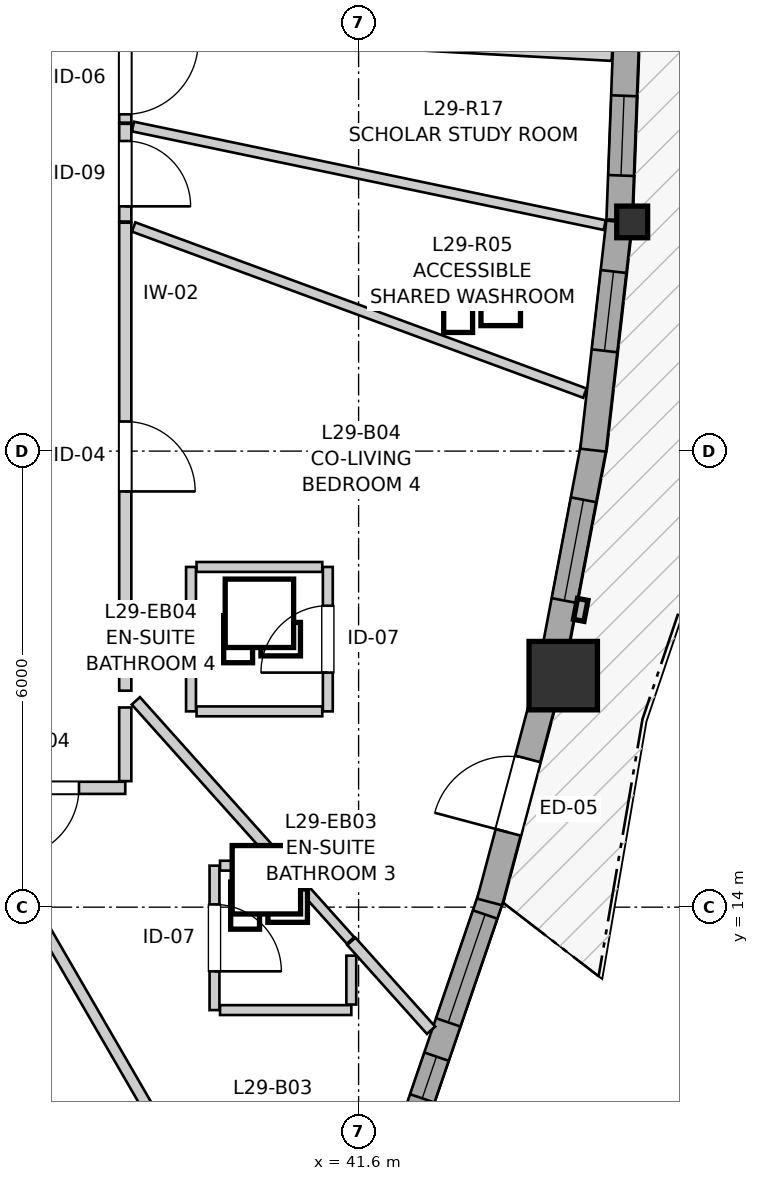
"""IFC4 building model, lengths in metres.
Left out: names, types, materials, properties, quantities, classifications, styles, units other than length and angle.
Written with IfcOpenShell. Run it as: python <this file> out.ifc"""

import sys

from ifc_helpers import new_model, si_unit, direction, frame, frame_2d, origin, origin_2d, place, context, subcontext, project, spatial, rectangle, i_section, extrude, source, transform, mapped, element, fill, save


model = new_model("IFC4")
c1 = context("Model", 3, precision=1e-05, world=origin(), true_north=direction((0.0, 1.0)))
c2 = subcontext(c1, "Body", "Model", "MODEL_VIEW")
j1 = project(units=[si_unit("LENGTHUNIT", "METRE"), si_unit("PLANEANGLEUNIT", "RADIAN")], contexts=[c1])
p1 = place(None, origin())
s1 = spatial("IfcSite", under=j1, at=p1, CompositionType="ELEMENT")
p2 = place(p1, origin())
s2 = spatial("IfcBuilding", under=s1, at=p2, CompositionType="ELEMENT")
p3 = place(p2, frame((0.0, 0.0, 99.2)))
s3 = spatial("IfcBuildingStorey", under=s2, at=p3, CompositionType="ELEMENT", Elevation=99.2)
m1 = source(origin(), c2, "Body", "SweptSolid", [
    extrude(rectangle(XDim=0.9, YDim=0.9, at=origin_2d()), origin(), (0.0, 0.0, 1.0), 2.95),
])
p4 = place(p3, frame((44.292, 17.046, 0.0), z_axis=(0.0, 0.0, 1.0), x_axis=(1.0, 0.0, 0.0)))
e1 = element("IfcColumn", 1, at=p4, inside=s3, PredefinedType="COLUMN", context=c2, shape_type="MappedRepresentation", body=[
    mapped(m1, transform((0.0, 0.0, 0.0), x_axis=(1.0, 0.0, 0.0), y_axis=(0.0, 1.0, 0.0), z_axis=(0.0, 0.0, 1.0), scale=1.0)),
])
m2 = source(origin(), c2, "Body", "SweptSolid", [
    extrude(i_section(OverallWidth=0.406, OverallDepth=0.416, WebThickness=0.027, FlangeThickness=0.044, FilletRadius=0.015, at=origin_2d()), origin(), (0.0, 0.0, 1.0), 2.95),
])
p5 = place(p3, frame((45.199, 23.015, 0.0), z_axis=(0.0, 0.0, 1.0), x_axis=(1.0, 0.0, 0.0)))
e2 = element("IfcColumn", 2, at=p5, inside=s3, PredefinedType="PILASTER", context=c2, shape_type="MappedRepresentation", body=[
    mapped(m2, transform((0.0, 0.0, 0.0), x_axis=(1.0, 0.0, 0.0), y_axis=(0.0, 1.0, 0.0), z_axis=(0.0, 0.0, 1.0), scale=1.0)),
])
p6 = place(p3, frame((42.323, 11.151, 0.0), z_axis=(0.0, 0.0, 1.0), x_axis=(0.323606092462, 0.94619189223, 0.0)))
e3 = element("IfcWall", 3, at=p6, inside=s3, PredefinedType="SOLIDWALL", context=c2, shape_type="SweptSolid", body=[
    extrude(rectangle(XDim=3.172, YDim=0.34, at=frame_2d((1.586, 0.0))), origin(), (0.0, 0.0, 1.0), 2.48),
])
p7 = place(p6, frame((0.353, 0.0, 0.82)))
e4 = element("IfcOpeningElement", 4, at=p7, cuts=e3, PredefinedType="OPENING", context=c2, shape_type="SweptSolid", body=[
    extrude(rectangle(XDim=0.58, YDim=1.35, at=frame_2d((0.29, 0.675))), frame((0.0, 0.18, 0.0), z_axis=(0.0, -1.0, 0.0), x_axis=(1.0, 0.0, 0.0)), (0.0, 0.0, 1.0), 0.36),
])
p8 = place(p6, frame((1.41, 0.0, 0.82)))
e5 = element("IfcOpeningElement", 5, at=p8, cuts=e3, PredefinedType="OPENING", context=c2, shape_type="SweptSolid", body=[
    extrude(rectangle(XDim=1.5, YDim=1.45, at=frame_2d((0.75, 0.725))), frame((0.0, 0.18, 0.0), z_axis=(0.0, -1.0, 0.0), x_axis=(1.0, 0.0, 0.0)), (0.0, 0.0, 1.0), 0.36),
])
p9 = place(p3, frame((43.324, 14.068, 0.0), z_axis=(0.0, 0.0, 1.0), x_axis=(0.257085513118, 0.966388658328, 0.0)))
e6 = element("IfcWall", 6, at=p9, inside=s3, PredefinedType="SOLIDWALL", context=c2, shape_type="SweptSolid", body=[
    extrude(rectangle(XDim=2.896, YDim=0.34, at=frame_2d((1.448, 0.0))), origin(), (0.0, 0.0, 1.0), 2.48),
])
p10 = place(p9, frame((0.948, 0.0, 0.0)))
e7 = element("IfcOpeningElement", 7, at=p10, cuts=e6, PredefinedType="OPENING", context=c2, shape_type="SweptSolid", body=[
    extrude(rectangle(XDim=1.0, YDim=2.1, at=frame_2d((0.5, 1.05))), frame((0.0, 0.18, 0.0), z_axis=(0.0, -1.0, 0.0), x_axis=(1.0, 0.0, 0.0)), (0.0, 0.0, 1.0), 0.36),
])
p11 = place(p3, frame((44.168, 17.304, 0.0), z_axis=(0.0, 0.0, 1.0), x_axis=(0.186654850509, 0.982425552793, 0.0)))
e8 = element("IfcWall", 8, at=p11, inside=s3, PredefinedType="SOLIDWALL", context=c2, shape_type="SweptSolid", body=[
    extrude(rectangle(XDim=2.846, YDim=0.34, at=frame_2d((1.423, 0.0))), origin(), (0.0, 0.0, 1.0), 2.48),
])
p12 = place(p11, frame((0.743, 0.0, 0.82)))
e9 = element("IfcOpeningElement", 9, at=p12, cuts=e8, PredefinedType="OPENING", context=c2, shape_type="SweptSolid", body=[
    extrude(rectangle(XDim=1.35, YDim=1.45, at=frame_2d((0.675, 0.725))), frame((0.0, 0.18, 0.0), z_axis=(0.0, -1.0, 0.0), x_axis=(1.0, 0.0, 0.0)), (0.0, 0.0, 1.0), 0.36),
])
p13 = place(p3, frame((44.686, 20.012, 0.0), z_axis=(0.0, 0.0, 1.0), x_axis=(0.113268604106, 0.993564403209, 0.0)))
e10 = element("IfcWall", 10, at=p13, inside=s3, PredefinedType="SOLIDWALL", context=c2, shape_type="SweptSolid", body=[
    extrude(rectangle(XDim=3.022, YDim=0.34, at=frame_2d((1.511, 0.0))), origin(), (0.0, 0.0, 1.0), 2.48),
])
p14 = place(p13, frame((1.316, 0.0, 0.82)))
e11 = element("IfcOpeningElement", 11, at=p14, cuts=e10, PredefinedType="OPENING", context=c2, shape_type="SweptSolid", body=[
    extrude(rectangle(XDim=1.05, YDim=1.45, at=frame_2d((0.525, 0.725))), frame((0.0, 0.18, 0.0), z_axis=(0.0, -1.0, 0.0), x_axis=(1.0, 0.0, 0.0)), (0.0, 0.0, 1.0), 0.36),
])
p15 = place(p3, frame((45.031, 23.042, 0.0), z_axis=(0.0, 0.0, 1.0), x_axis=(0.037943223979, 0.999279896603, 0.0)))
e12 = element("IfcWall", 12, at=p15, inside=s3, PredefinedType="SOLIDWALL", context=c2, shape_type="SweptSolid", body=[
    extrude(rectangle(XDim=3.005, YDim=0.34, at=frame_2d((1.502, 0.0))), origin(), (0.0, 0.0, 1.0), 2.48),
])
p16 = place(p15, frame((0.584, 0.0, 0.82)))
e13 = element("IfcOpeningElement", 13, at=p16, cuts=e12, PredefinedType="OPENING", context=c2, shape_type="SweptSolid", body=[
    extrude(rectangle(XDim=1.05, YDim=1.45, at=frame_2d((0.525, 0.725))), frame((0.0, 0.18, 0.0), z_axis=(0.0, -1.0, 0.0), x_axis=(1.0, 0.0, 0.0)), (0.0, 0.0, 1.0), 0.36),
])
p17 = place(p3, frame((38.53, 23.005, 0.0), z_axis=(0.0, 0.0, 1.0), x_axis=(0.0, -1.0, 0.0)))
e14 = element("IfcWall", 14, at=p17, inside=s3, PredefinedType="PARTITIONING", context=c2, shape_type="SweptSolid", body=[
    extrude(rectangle(XDim=6.157, YDim=0.16, at=frame_2d((3.079, 0.0))), origin(), (0.0, 0.0, 1.0), 2.95),
])
p18 = place(p17, frame((2.615, 0.0, 0.0)))
e15 = element("IfcOpeningElement", 15, at=p18, cuts=e14, PredefinedType="OPENING", context=c2, shape_type="SweptSolid", body=[
    extrude(rectangle(XDim=0.92, YDim=2.1, at=frame_2d((0.46, 1.05))), frame((0.0, 0.09, 0.0), z_axis=(0.0, -1.0, 0.0), x_axis=(1.0, 0.0, 0.0)), (0.0, 0.0, 1.0), 0.18),
])
p19 = place(p3, frame((38.53, 15.57, 0.0), z_axis=(0.0, 0.0, 1.0), x_axis=(-1.0, 0.0, 0.0)))
e16 = element("IfcWall", 16, at=p19, inside=s3, PredefinedType="PARTITIONING", context=c2, shape_type="SweptSolid", body=[
    extrude(rectangle(XDim=2.156, YDim=0.16, at=frame_2d((1.078, 0.0))), origin(), (0.0, 0.0, 1.0), 2.95),
])
p20 = place(p19, frame((0.609, 0.0, 0.0)))
e17 = element("IfcOpeningElement", 17, at=p20, cuts=e16, PredefinedType="OPENING", context=c2, shape_type="SweptSolid", body=[
    extrude(rectangle(XDim=0.92, YDim=2.1, at=frame_2d((0.46, 1.05))), frame((0.0, 0.09, 0.0), z_axis=(0.0, -1.0, 0.0), x_axis=(1.0, 0.0, 0.0)), (0.0, 0.0, 1.0), 0.18),
])
p21 = place(p3, frame((39.704, 14.546, 0.0), z_axis=(0.0, 0.0, 1.0), x_axis=(0.0, -1.0, 0.0)))
e18 = element("IfcWall", 18, at=p21, inside=s3, PredefinedType="PARTITIONING", context=c2, shape_type="SweptSolid", body=[
    extrude(rectangle(XDim=1.9, YDim=0.13, at=frame_2d((0.95, 0.0))), origin(), (0.0, 0.0, 1.0), 2.95),
])
p22 = place(p21, frame((0.51, 0.0, 0.0)))
e19 = element("IfcOpeningElement", 19, at=p22, cuts=e18, PredefinedType="OPENING", context=c2, shape_type="SweptSolid", body=[
    extrude(rectangle(XDim=0.88, YDim=2.05, at=frame_2d((0.44, 1.025))), frame((0.0, 0.075, 0.0), z_axis=(0.0, -1.0, 0.0), x_axis=(1.0, 0.0, 0.0)), (0.0, 0.0, 1.0), 0.15),
])
p23 = place(p3, frame((41.195, 16.576, 0.0), z_axis=(0.0, 0.0, 1.0), x_axis=(0.0, 1.0, 0.0)))
e20 = element("IfcWall", 20, at=p23, inside=s3, PredefinedType="PARTITIONING", context=c2, shape_type="SweptSolid", body=[
    extrude(rectangle(XDim=1.9, YDim=0.13, at=frame_2d((0.95, 0.0))), origin(), (0.0, 0.0, 1.0), 2.95),
])
p24 = place(p23, frame((0.51, 0.0, 0.0)))
e21 = element("IfcOpeningElement", 21, at=p24, cuts=e20, PredefinedType="OPENING", context=c2, shape_type="SweptSolid", body=[
    extrude(rectangle(XDim=0.88, YDim=2.05, at=frame_2d((0.44, 1.025))), frame((0.0, 0.075, 0.0), z_axis=(0.0, -1.0, 0.0), x_axis=(1.0, 0.0, 0.0)), (0.0, 0.0, 1.0), 0.15),
])
p25 = place(p3, frame((38.53, 24.306, 0.0), z_axis=(0.0, 0.0, 1.0), x_axis=(0.0, -1.0, 0.0)))
e22 = element("IfcWall", 22, at=p25, inside=s3, PredefinedType="PARTITIONING", context=c2, shape_type="SweptSolid", body=[
    extrude(rectangle(XDim=1.286, YDim=0.16, at=frame_2d((0.643, 0.0))), origin(), (0.0, 0.0, 1.0), 2.95),
])
p26 = place(p25, frame((0.226, 0.0, 0.0)))
e23 = element("IfcOpeningElement", 23, at=p26, cuts=e22, PredefinedType="OPENING", context=c2, shape_type="SweptSolid", body=[
    extrude(rectangle(XDim=0.86, YDim=2.05, at=frame_2d((0.43, 1.025))), frame((0.0, 0.09, 0.0), z_axis=(0.0, -1.0, 0.0), x_axis=(1.0, 0.0, 0.0)), (0.0, 0.0, 1.0), 0.18),
])
p27 = place(p3, frame((38.53, 25.525, 0.0), z_axis=(0.0, 0.0, 1.0), x_axis=(0.0, -1.0, 0.0)))
e24 = element("IfcWall", 24, at=p27, inside=s3, PredefinedType="PARTITIONING", context=c2, shape_type="SweptSolid", body=[
    extrude(rectangle(XDim=1.204, YDim=0.16, at=frame_2d((0.602, 0.0))), origin(), (0.0, 0.0, 1.0), 2.95),
])
p28 = place(p27, frame((0.134, 0.0, 0.0)))
e25 = element("IfcOpeningElement", 25, at=p28, cuts=e24, PredefinedType="OPENING", context=c2, shape_type="SweptSolid", body=[
    extrude(rectangle(XDim=0.96, YDim=2.1, at=frame_2d((0.48, 1.05))), frame((0.0, 0.09, 0.0), z_axis=(0.0, -1.0, 0.0), x_axis=(1.0, 0.0, 0.0)), (0.0, 0.0, 1.0), 0.18),
])
p29 = place(p3, frame((34.4, 15.457, 0.0), z_axis=(0.0, 0.0, 1.0), x_axis=(0.358586620169, -0.933496457324, 0.0)))
e26 = element("IfcWall", 26, at=p29, inside=s3, PredefinedType="PARTITIONING", context=c2, shape_type="SweptSolid", body=[
    extrude(rectangle(XDim=10.256, YDim=0.145, at=frame_2d((5.128, 0.0))), origin(), (0.0, 0.0, 1.0), 2.95),
])
p30 = place(p3, frame((36.463, 15.447, 0.0), z_axis=(0.0, 0.0, 1.0), x_axis=(0.501201369888, -0.86533068062, 0.0)))
e27 = element("IfcWall", 27, at=p30, inside=s3, PredefinedType="PARTITIONING", context=c2, shape_type="SweptSolid", body=[
    extrude(rectangle(XDim=8.918, YDim=0.145, at=frame_2d((4.459, 0.0))), origin(), (0.0, 0.0, 1.0), 2.95),
])
p31 = place(p3, frame((38.64, 22.948, 0.0), z_axis=(0.0, 0.0, 1.0), x_axis=(0.938426101424, -0.3454800315, 0.0)))
e28 = element("IfcWall", 28, at=p31, inside=s3, PredefinedType="PARTITIONING", context=c2, shape_type="SweptSolid", body=[
    extrude(rectangle(XDim=6.327, YDim=0.13, at=frame_2d((3.164, 0.0))), origin(), (0.0, 0.0, 1.0), 2.95),
])
p32 = place(p3, frame((38.631, 24.27, 0.0), z_axis=(0.0, 0.0, 1.0), x_axis=(0.978856283814, -0.204549201019, 0.0)))
e29 = element("IfcWall", 29, at=p32, inside=s3, PredefinedType="PARTITIONING", context=c2, shape_type="SweptSolid", body=[
    extrude(rectangle(XDim=6.341, YDim=0.13, at=frame_2d((3.171, 0.0))), origin(), (0.0, 0.0, 1.0), 2.95),
])
p33 = place(p3, frame((38.622, 25.55, 0.0), z_axis=(0.0, 0.0, 1.0), x_axis=(0.998518036703, -0.054421782211, 0.0)))
e30 = element("IfcWall", 30, at=p33, inside=s3, PredefinedType="PARTITIONING", context=c2, shape_type="SweptSolid", body=[
    extrude(rectangle(XDim=6.321, YDim=0.145, at=frame_2d((3.16, 0.0))), origin(), (0.0, 0.0, 1.0), 2.95),
])
p34 = place(p3, frame((38.669, 16.715, 0.0), z_axis=(0.0, 0.0, 1.0), x_axis=(0.667262858083, -0.744822313188, 0.0)))
e31 = element("IfcWall", 31, at=p34, inside=s3, PredefinedType="PARTITIONING", context=c2, shape_type="SweptSolid", body=[
    extrude(rectangle(XDim=2.912, YDim=0.145, at=frame_2d((1.456, 0.0))), origin(), (0.0, 0.0, 1.0), 2.95),
])
p35 = place(p3, frame((39.395, 16.576, 0.0), z_axis=(0.0, 0.0, 1.0), x_axis=(0.0, 1.0, 0.0)))
e32 = element("IfcWall", 32, at=p35, inside=s3, PredefinedType="PARTITIONING", context=c2, shape_type="SweptSolid", body=[
    extrude(rectangle(XDim=1.9, YDim=0.13, at=frame_2d((0.95, 0.0))), origin(), (0.0, 0.0, 1.0), 2.95),
])
p36 = place(p3, frame((39.777, 12.646, 0.0), z_axis=(0.0, 0.0, 1.0), x_axis=(1.0, 0.0, 0.0)))
e33 = element("IfcWall", 33, at=p36, inside=s3, PredefinedType="PARTITIONING", context=c2, shape_type="SweptSolid", body=[
    extrude(rectangle(XDim=1.727, YDim=0.13, at=frame_2d((0.863, 0.0))), origin(), (0.0, 0.0, 1.0), 2.95),
])
for number, where, z_axis, x_axis in (
    (34, (39.468, 18.476, 0.0), (0.0, 0.0, 1.0), (1.0, 0.0, 0.0)),
    (35, (39.468, 16.576, 0.0), (0.0, 0.0, 1.0), (1.0, 0.0, 0.0)),
):
    element("IfcWall", number, at=place(p3, frame(where, z_axis=z_axis, x_axis=x_axis)), inside=s3, PredefinedType="PARTITIONING", context=c2, shape_type="SweptSolid", body=[
        extrude(rectangle(XDim=1.654, YDim=0.13, at=frame_2d((0.827, 0.0))), origin(), (0.0, 0.0, 1.0), 2.95),
    ])
p37 = place(p3, frame((41.504, 13.551, 0.0), z_axis=(0.0, 0.0, 1.0), x_axis=(0.667530166935, -0.744582753112, 0.0)))
e36 = element("IfcWall", 36, at=p37, inside=s3, PredefinedType="PARTITIONING", context=c2, shape_type="SweptSolid", body=[
    extrude(rectangle(XDim=1.572, YDim=0.145, at=frame_2d((0.786, 0.0))), origin(), (0.0, 0.0, 1.0), 2.95),
])
p38 = place(p3, frame((40.622, 14.535, 0.0), z_axis=(0.0, 0.0, 1.0), x_axis=(0.667455683483, -0.744649521981, 0.0)))
e37 = element("IfcWall", 37, at=p38, inside=s3, PredefinedType="PARTITIONING", context=c2, shape_type="SweptSolid", body=[
    extrude(rectangle(XDim=1.306, YDim=0.13, at=frame_2d((0.653, 0.0))), origin(), (0.0, 0.0, 1.0), 2.95),
])
p39 = place(p3, frame((38.53, 15.658, 0.0), z_axis=(0.0, 0.0, 1.0), x_axis=(0.0, 1.0, 0.0)))
e38 = element("IfcWall", 38, at=p39, inside=s3, PredefinedType="PARTITIONING", context=c2, shape_type="SweptSolid", body=[
    extrude(rectangle(XDim=0.969, YDim=0.16, at=frame_2d((0.484, 0.0))), origin(), (0.0, 0.0, 1.0), 2.95),
])
p40 = place(p3, frame((39.777, 14.546, 0.0), z_axis=(0.0, 0.0, 1.0), x_axis=(1.0, 0.0, 0.0)))
e39 = element("IfcWall", 39, at=p40, inside=s3, PredefinedType="PARTITIONING", context=c2, shape_type="SweptSolid", body=[
    extrude(rectangle(XDim=0.671, YDim=0.13, at=frame_2d((0.336, 0.0))), origin(), (0.0, 0.0, 1.0), 2.95),
])
p41 = place(p3, frame((41.504, 12.719, 0.0), z_axis=(0.0, 0.0, 1.0), x_axis=(0.0, 1.0, 0.0)))
e40 = element("IfcWall", 40, at=p41, inside=s3, PredefinedType="PARTITIONING", context=c2, shape_type="SweptSolid", body=[
    extrude(rectangle(XDim=0.643, YDim=0.13, at=frame_2d((0.321, 0.0))), origin(), (0.0, 0.0, 1.0), 2.95),
])
m3 = source(origin(), c2, "Body", "SweptSolid", [
    extrude(rectangle(XDim=0.58, YDim=1.35, at=frame_2d((0.29, 0.675))), frame((0.0, 0.03, 0.0), z_axis=(0.0, -1.0, 0.0), x_axis=(1.0, 0.0, 0.0)), (0.0, 0.0, 1.0), 0.06),
])
p42 = place(p7, origin())
e41 = element("IfcWindow", 41, at=p42, inside=s3, PartitioningType="SINGLE_PANEL", PredefinedType="WINDOW", context=c2, shape_type="MappedRepresentation", body=[
    mapped(m3, transform((0.0, 0.0, 0.0), x_axis=(1.0, 0.0, 0.0), y_axis=(0.0, 1.0, 0.0), z_axis=(0.0, 0.0, 1.0), scale=1.0)),
])
fill(e4, e41)
m4 = source(origin(), c2, "Body", "SweptSolid", [
    extrude(rectangle(XDim=1.5, YDim=1.45, at=frame_2d((0.75, 0.725))), frame((0.0, 0.03, 0.0), z_axis=(0.0, -1.0, 0.0), x_axis=(1.0, 0.0, 0.0)), (0.0, 0.0, 1.0), 0.06),
])
p43 = place(p8, origin())
e42 = element("IfcWindow", 42, at=p43, inside=s3, PartitioningType="SINGLE_PANEL", PredefinedType="WINDOW", context=c2, shape_type="MappedRepresentation", body=[
    mapped(m4, transform((0.0, 0.0, 0.0), x_axis=(1.0, 0.0, 0.0), y_axis=(0.0, 1.0, 0.0), z_axis=(0.0, 0.0, 1.0), scale=1.0)),
])
fill(e5, e42)
m5 = source(origin(), c2, "Body", "SweptSolid", [
    extrude(rectangle(XDim=1.35, YDim=1.45, at=frame_2d((0.675, 0.725))), frame((0.0, 0.03, 0.0), z_axis=(0.0, -1.0, 0.0), x_axis=(1.0, 0.0, 0.0)), (0.0, 0.0, 1.0), 0.06),
])
p44 = place(p12, origin())
e43 = element("IfcWindow", 43, at=p44, inside=s3, PartitioningType="SINGLE_PANEL", PredefinedType="WINDOW", context=c2, shape_type="MappedRepresentation", body=[
    mapped(m5, transform((0.0, 0.0, 0.0), x_axis=(1.0, 0.0, 0.0), y_axis=(0.0, 1.0, 0.0), z_axis=(0.0, 0.0, 1.0), scale=1.0)),
])
fill(e9, e43)
m6 = source(origin(), c2, "Body", "SweptSolid", [
    extrude(rectangle(XDim=1.05, YDim=1.45, at=frame_2d((0.525, 0.725))), frame((0.0, 0.03, 0.0), z_axis=(0.0, -1.0, 0.0), x_axis=(1.0, 0.0, 0.0)), (0.0, 0.0, 1.0), 0.06),
])
p45 = place(p14, origin())
e44 = element("IfcWindow", 44, at=p45, inside=s3, PartitioningType="SINGLE_PANEL", PredefinedType="WINDOW", context=c2, shape_type="MappedRepresentation", body=[
    mapped(m6, transform((0.0, 0.0, 0.0), x_axis=(1.0, 0.0, 0.0), y_axis=(0.0, 1.0, 0.0), z_axis=(0.0, 0.0, 1.0), scale=1.0)),
])
fill(e11, e44)
p46 = place(p16, origin())
e45 = element("IfcWindow", 45, at=p46, inside=s3, PartitioningType="SINGLE_PANEL", PredefinedType="WINDOW", context=c2, shape_type="MappedRepresentation", body=[
    mapped(m6, transform((0.0, 0.0, 0.0), x_axis=(1.0, 0.0, 0.0), y_axis=(0.0, 1.0, 0.0), z_axis=(0.0, 0.0, 1.0), scale=1.0)),
])
fill(e13, e45)
m7 = source(origin(), c2, "Body", "SweptSolid", [
    extrude(rectangle(XDim=1.0, YDim=2.1, at=frame_2d((0.5, 1.05))), frame((0.0, 0.025, 0.0), z_axis=(0.0, -1.0, 0.0), x_axis=(1.0, 0.0, 0.0)), (0.0, 0.0, 1.0), 0.05),
])
p47 = place(p10, origin())
e46 = element("IfcDoor", 46, at=p47, inside=s3, OperationType="SINGLE_SWING_LEFT", PredefinedType="DOOR", context=c2, shape_type="MappedRepresentation", body=[
    mapped(m7, transform((0.0, 0.0, 0.0), x_axis=(1.0, 0.0, 0.0), y_axis=(0.0, 1.0, 0.0), z_axis=(0.0, 0.0, 1.0), scale=1.0)),
])
fill(e7, e46)
m8 = source(origin(), c2, "Body", "SweptSolid", [
    extrude(rectangle(XDim=0.92, YDim=2.1, at=frame_2d((0.46, 1.05))), frame((0.0, 0.025, 0.0), z_axis=(0.0, -1.0, 0.0), x_axis=(1.0, 0.0, 0.0)), (0.0, 0.0, 1.0), 0.05),
])
p48 = place(p18, origin())
e47 = element("IfcDoor", 47, at=p48, inside=s3, OperationType="SINGLE_SWING_RIGHT", PredefinedType="DOOR", context=c2, shape_type="MappedRepresentation", body=[
    mapped(m8, transform((0.0, 0.0, 0.0), x_axis=(1.0, 0.0, 0.0), y_axis=(0.0, 1.0, 0.0), z_axis=(0.0, 0.0, 1.0), scale=1.0)),
])
fill(e15, e47)
p49 = place(p20, origin())
e48 = element("IfcDoor", 48, at=p49, inside=s3, OperationType="SINGLE_SWING_RIGHT", PredefinedType="DOOR", context=c2, shape_type="MappedRepresentation", body=[
    mapped(m8, transform((0.0, 0.0, 0.0), x_axis=(1.0, 0.0, 0.0), y_axis=(0.0, 1.0, 0.0), z_axis=(0.0, 0.0, 1.0), scale=1.0)),
])
fill(e17, e48)
m9 = source(origin(), c2, "Body", "SweptSolid", [
    extrude(rectangle(XDim=0.88, YDim=2.05, at=frame_2d((0.44, 1.025))), frame((0.0, 0.025, 0.0), z_axis=(0.0, -1.0, 0.0), x_axis=(1.0, 0.0, 0.0)), (0.0, 0.0, 1.0), 0.05),
])
p50 = place(p22, origin())
e49 = element("IfcDoor", 49, at=p50, inside=s3, OperationType="SINGLE_SWING_RIGHT", PredefinedType="DOOR", context=c2, shape_type="MappedRepresentation", body=[
    mapped(m9, transform((0.0, 0.0, 0.0), x_axis=(1.0, 0.0, 0.0), y_axis=(0.0, 1.0, 0.0), z_axis=(0.0, 0.0, 1.0), scale=1.0)),
])
fill(e19, e49)
p51 = place(p24, origin())
e50 = element("IfcDoor", 50, at=p51, inside=s3, OperationType="SINGLE_SWING_LEFT", PredefinedType="DOOR", context=c2, shape_type="MappedRepresentation", body=[
    mapped(m9, transform((0.0, 0.0, 0.0), x_axis=(1.0, 0.0, 0.0), y_axis=(0.0, 1.0, 0.0), z_axis=(0.0, 0.0, 1.0), scale=1.0)),
])
fill(e21, e50)
m10 = source(origin(), c2, "Body", "SweptSolid", [
    extrude(rectangle(XDim=0.86, YDim=2.05, at=frame_2d((0.43, 1.025))), frame((0.0, 0.025, 0.0), z_axis=(0.0, -1.0, 0.0), x_axis=(1.0, 0.0, 0.0)), (0.0, 0.0, 1.0), 0.05),
])
p52 = place(p26, origin())
e51 = element("IfcDoor", 51, at=p52, inside=s3, OperationType="SINGLE_SWING_RIGHT", PredefinedType="DOOR", context=c2, shape_type="MappedRepresentation", body=[
    mapped(m10, transform((0.0, 0.0, 0.0), x_axis=(1.0, 0.0, 0.0), y_axis=(0.0, 1.0, 0.0), z_axis=(0.0, 0.0, 1.0), scale=1.0)),
])
fill(e23, e51)
m11 = source(origin(), c2, "Body", "SweptSolid", [
    extrude(rectangle(XDim=0.96, YDim=2.1, at=frame_2d((0.48, 1.05))), frame((0.0, 0.025, 0.0), z_axis=(0.0, -1.0, 0.0), x_axis=(1.0, 0.0, 0.0)), (0.0, 0.0, 1.0), 0.05),
])
p53 = place(p28, origin())
e52 = element("IfcDoor", 52, at=p53, inside=s3, OperationType="SINGLE_SWING_LEFT", PredefinedType="DOOR", context=c2, shape_type="MappedRepresentation", body=[
    mapped(m11, transform((0.0, 0.0, 0.0), x_axis=(1.0, 0.0, 0.0), y_axis=(0.0, 1.0, 0.0), z_axis=(0.0, 0.0, 1.0), scale=1.0)),
])
fill(e25, e52)
save(model, sys.argv[1])
